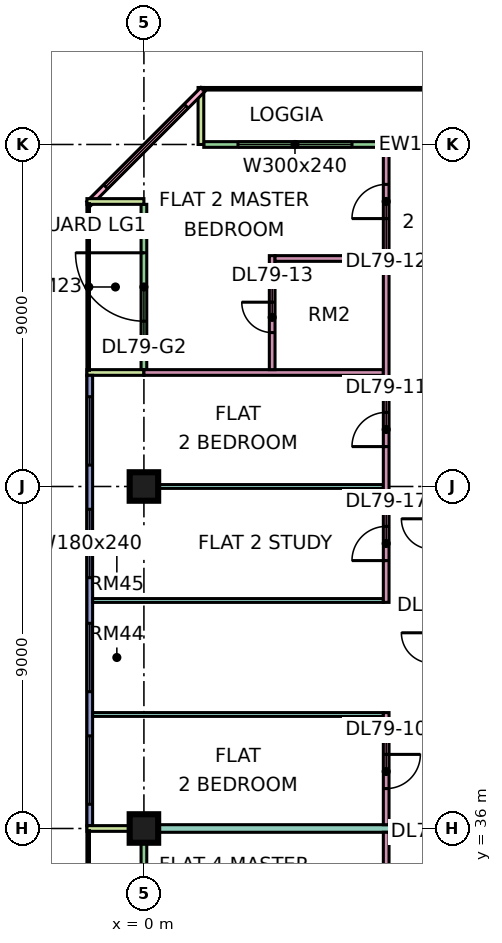
"""IFC4 building model, lengths in metres.
Left out: names, types, materials, properties, quantities, classifications, styles, units other than length and angle.
Written with IfcOpenShell. Run it as: python <this file> out.ifc"""

import sys

from ifc_helpers import new_model, si_unit, direction, frame, frame_2d, origin, origin_2d, place, context, subcontext, project, spatial, rectangle, extrude, element, fill, save


model = new_model("IFC4")
c1 = context("Model", 3, precision=1e-05, world=origin(), true_north=direction((0.0, 1.0)))
c2 = subcontext(c1, "Body", "Model", "MODEL_VIEW")
j1 = project(units=[si_unit("LENGTHUNIT", "METRE"), si_unit("PLANEANGLEUNIT", "RADIAN")], contexts=[c1])
p1 = place(None, origin())
s1 = spatial("IfcSite", under=j1, at=p1, CompositionType="ELEMENT")
p2 = place(p1, origin())
s2 = spatial("IfcBuilding", under=s1, at=p2, CompositionType="ELEMENT")
p3 = place(p2, frame((0.0, 0.0, 342.65)))
s3 = spatial("IfcBuildingStorey", under=s2, at=p3, CompositionType="ELEMENT", Elevation=342.65)
p4 = place(p3, frame((0.0, 36.0, 0.0), z_axis=(0.0, 0.0, 1.0), x_axis=(1.0, 0.0, 0.0)))
e1 = element("IfcColumn", 1, at=p4, inside=s3, PredefinedType="COLUMN", context=c2, shape_type="SweptSolid", body=[
    extrude(rectangle(XDim=0.75, YDim=0.75, at=origin_2d()), origin(), (0.0, 0.0, 1.0), 3.75),
])
p5 = place(p3, frame((0.0, 45.0, 0.0), z_axis=(0.0, 0.0, 1.0), x_axis=(1.0, 0.0, 0.0)))
e2 = element("IfcColumn", 2, at=p5, inside=s3, PredefinedType="COLUMN", context=c2, shape_type="SweptSolid", body=[
    extrude(rectangle(XDim=0.75, YDim=0.75, at=origin_2d()), origin(), (0.0, 0.0, 1.0), 3.75),
])
p6 = place(p3, frame((11.925, 54.0, 0.0), z_axis=(0.0, 0.0, 1.0), x_axis=(-1.0, 0.0, 0.0)))
e3 = element("IfcWall", 3, at=p6, inside=s3, PredefinedType="SOLIDWALL", context=c2, shape_type="SweptSolid", body=[
    extrude(rectangle(XDim=10.35, YDim=0.15, at=frame_2d((5.175, 0.0))), origin(), (0.0, 0.0, 1.0), 3.35),
])
p7 = place(p6, frame((2.075, 0.0, 0.0)))
e4 = element("IfcOpeningElement", 4, at=p7, cuts=e3, PredefinedType="OPENING", context=c2, shape_type="SweptSolid", body=[
    extrude(rectangle(XDim=1.8, YDim=2.4, at=frame_2d((0.9, 1.2))), frame((0.0, 0.085, 0.0), z_axis=(0.0, -1.0, 0.0), x_axis=(1.0, 0.0, 0.0)), (0.0, 0.0, 1.0), 0.17),
])
p8 = place(p6, frame((6.45, 0.0, 0.45)))
e5 = element("IfcOpeningElement", 5, at=p8, cuts=e3, PredefinedType="OPENING", context=c2, shape_type="SweptSolid", body=[
    extrude(rectangle(XDim=3.0, YDim=2.4, at=frame_2d((1.5, 1.2))), frame((0.0, 0.085, 0.0), z_axis=(0.0, -1.0, 0.0), x_axis=(1.0, 0.0, 0.0)), (0.0, 0.0, 1.0), 0.17),
])
p9 = place(p3, frame((1.5, 55.5, 0.0), z_axis=(0.0, 0.0, 1.0), x_axis=(0.0, -1.0, 0.0)))
e6 = element("IfcWall", 6, at=p9, inside=s3, PredefinedType="SOLIDWALL", context=c2, shape_type="SweptSolid", body=[
    extrude(rectangle(XDim=1.5, YDim=0.15, at=frame_2d((0.75, 0.0))), origin(), (0.0, 0.0, 1.0), 3.35),
])
p10 = place(p3, frame((1.553, 55.447, 0.0), z_axis=(0.0, 0.0, 1.0), x_axis=(-0.707106781187, -0.707106781187, 0.0)))
e7 = element("IfcWall", 7, at=p10, inside=s3, PredefinedType="SOLIDWALL", context=c2, shape_type="SweptSolid", body=[
    extrude(rectangle(XDim=4.243, YDim=0.15, at=frame_2d((2.121, 0.0))), origin(), (0.0, 0.0, 1.0), 3.35),
])
p11 = place(p10, frame((0.621, 0.0, 0.45)))
e8 = element("IfcOpeningElement", 8, at=p11, cuts=e7, PredefinedType="OPENING", context=c2, shape_type="SweptSolid", body=[
    extrude(rectangle(XDim=3.0, YDim=2.4, at=frame_2d((1.5, 1.2))), frame((0.0, 0.085, 0.0), z_axis=(0.0, -1.0, 0.0), x_axis=(1.0, 0.0, 0.0)), (0.0, 0.0, 1.0), 0.17),
])
p12 = place(p3, frame((0.0, 52.425, 0.0), z_axis=(0.0, 0.0, 1.0), x_axis=(0.0, -1.0, 0.0)))
e9 = element("IfcWall", 9, at=p12, inside=s3, PredefinedType="SOLIDWALL", context=c2, shape_type="SweptSolid", body=[
    extrude(rectangle(XDim=4.35, YDim=0.15, at=frame_2d((2.175, 0.0))), origin(), (0.0, 0.0, 1.0), 3.35),
])
p13 = place(p12, frame((1.275, 0.0, 0.0)))
e10 = element("IfcOpeningElement", 10, at=p13, cuts=e9, PredefinedType="OPENING", context=c2, shape_type="SweptSolid", body=[
    extrude(rectangle(XDim=1.8, YDim=2.4, at=frame_2d((0.9, 1.2))), frame((0.0, 0.085, 0.0), z_axis=(0.0, -1.0, 0.0), x_axis=(1.0, 0.0, 0.0)), (0.0, 0.0, 1.0), 0.17),
])
for number, where, z_axis, x_axis in (
    (11, (-1.5, 52.5, 0.0), (0.0, 0.0, 1.0), (1.0, 0.0, 0.0)),
    (12, (-1.5, 48.0, 0.0), (0.0, 0.0, 1.0), (1.0, 0.0, 0.0)),
):
    element("IfcWall", number, at=place(p3, frame(where, z_axis=z_axis, x_axis=x_axis)), inside=s3, PredefinedType="SOLIDWALL", context=c2, shape_type="SweptSolid", body=[
        extrude(rectangle(XDim=1.5, YDim=0.15, at=frame_2d((0.75, 0.0))), origin(), (0.0, 0.0, 1.0), 3.35),
    ])
p14 = place(p3, frame((-1.425, 47.925, 0.0), z_axis=(0.0, 0.0, 1.0), x_axis=(0.0, -1.0, 0.0)))
e13 = element("IfcWall", 13, at=p14, inside=s3, PredefinedType="SOLIDWALL", context=c2, shape_type="SweptSolid", body=[
    extrude(rectangle(XDim=11.85, YDim=0.15, at=frame_2d((5.925, 0.0))), origin(), (0.0, 0.0, 1.0), 3.35),
])
p15 = place(p14, frame((0.562, 0.0, 0.45)))
e14 = element("IfcOpeningElement", 14, at=p15, cuts=e13, PredefinedType="OPENING", context=c2, shape_type="SweptSolid", body=[
    extrude(rectangle(XDim=1.8, YDim=2.4, at=frame_2d((0.9, 1.2))), frame((0.0, 0.085, 0.0), z_axis=(0.0, -1.0, 0.0), x_axis=(1.0, 0.0, 0.0)), (0.0, 0.0, 1.0), 0.17),
])
p16 = place(p14, frame((3.525, 0.0, 0.45)))
e15 = element("IfcOpeningElement", 15, at=p16, cuts=e13, PredefinedType="OPENING", context=c2, shape_type="SweptSolid", body=[
    extrude(rectangle(XDim=1.8, YDim=2.4, at=frame_2d((0.9, 1.2))), frame((0.0, 0.085, 0.0), z_axis=(0.0, -1.0, 0.0), x_axis=(1.0, 0.0, 0.0)), (0.0, 0.0, 1.0), 0.17),
])
p17 = place(p14, frame((6.525, 0.0, 0.45)))
e16 = element("IfcOpeningElement", 16, at=p17, cuts=e13, PredefinedType="OPENING", context=c2, shape_type="SweptSolid", body=[
    extrude(rectangle(XDim=1.8, YDim=2.4, at=frame_2d((0.9, 1.2))), frame((0.0, 0.085, 0.0), z_axis=(0.0, -1.0, 0.0), x_axis=(1.0, 0.0, 0.0)), (0.0, 0.0, 1.0), 0.17),
])
p18 = place(p14, frame((9.488, 0.0, 0.45)))
e17 = element("IfcOpeningElement", 17, at=p18, cuts=e13, PredefinedType="OPENING", context=c2, shape_type="SweptSolid", body=[
    extrude(rectangle(XDim=1.8, YDim=2.4, at=frame_2d((0.9, 1.2))), frame((0.0, 0.085, 0.0), z_axis=(0.0, -1.0, 0.0), x_axis=(1.0, 0.0, 0.0)), (0.0, 0.0, 1.0), 0.17),
])
p19 = place(p3, frame((0.0, 35.925, 0.0), z_axis=(0.0, 0.0, 1.0), x_axis=(0.0, -1.0, 0.0)))
e18 = element("IfcWall", 18, at=p19, inside=s3, PredefinedType="SOLIDWALL", context=c2, shape_type="SweptSolid", body=[
    extrude(rectangle(XDim=11.85, YDim=0.15, at=frame_2d((5.925, 0.0))), origin(), (0.0, 0.0, 1.0), 3.35),
])
p20 = place(p19, frame((2.262, 0.0, 0.0)))
e19 = element("IfcOpeningElement", 19, at=p20, cuts=e18, PredefinedType="OPENING", context=c2, shape_type="SweptSolid", body=[
    extrude(rectangle(XDim=1.8, YDim=2.4, at=frame_2d((0.9, 1.2))), frame((0.0, 0.085, 0.0), z_axis=(0.0, -1.0, 0.0), x_axis=(1.0, 0.0, 0.0)), (0.0, 0.0, 1.0), 0.17),
])
p21 = place(p19, frame((7.188, 0.0, 0.45)))
e20 = element("IfcOpeningElement", 20, at=p21, cuts=e18, PredefinedType="OPENING", context=c2, shape_type="SweptSolid", body=[
    extrude(rectangle(XDim=3.0, YDim=2.4, at=frame_2d((1.5, 1.2))), frame((0.0, 0.085, 0.0), z_axis=(0.0, -1.0, 0.0), x_axis=(1.0, 0.0, 0.0)), (0.0, 0.0, 1.0), 0.17),
])
p22 = place(p3, frame((-1.5, 36.0, 0.0), z_axis=(0.0, 0.0, 1.0), x_axis=(1.0, 0.0, 0.0)))
e21 = element("IfcWall", 21, at=p22, inside=s3, PredefinedType="SOLIDWALL", context=c2, shape_type="SweptSolid", body=[
    extrude(rectangle(XDim=1.5, YDim=0.15, at=frame_2d((0.75, 0.0))), origin(), (0.0, 0.0, 1.0), 3.35),
])
e22 = element("IfcWall", 22, at=p4, inside=s3, PredefinedType="PARTITIONING", context=c2, shape_type="SweptSolid", body=[
    extrude(rectangle(XDim=12.275, YDim=0.2, at=frame_2d((6.137, 0.0))), origin(), (0.0, 0.0, 1.0), 3.35),
])
for number, where, z_axis, x_axis in (
    (23, (-1.35, 39.0, 0.0), (0.0, 0.0, 1.0), (1.0, 0.0, 0.0)),
    (24, (-1.35, 42.0, 0.0), (0.0, 0.0, 1.0), (1.0, 0.0, 0.0)),
):
    element("IfcWall", number, at=place(p3, frame(where, z_axis=z_axis, x_axis=x_axis)), inside=s3, PredefinedType="PARTITIONING", context=c2, shape_type="SweptSolid", body=[
        extrude(rectangle(XDim=7.65, YDim=0.1, at=frame_2d((3.825, 0.0))), origin(), (0.0, 0.0, 1.0), 3.35),
    ])
e25 = element("IfcWall", 25, at=p5, inside=s3, PredefinedType="PARTITIONING", context=c2, shape_type="SweptSolid", body=[
    extrude(rectangle(XDim=6.3, YDim=0.1, at=frame_2d((3.15, 0.0))), origin(), (0.0, 0.0, 1.0), 3.35),
])
p23 = place(p3, frame((0.0, 48.0, 0.0), z_axis=(0.0, 0.0, 1.0), x_axis=(1.0, 0.0, 0.0)))
e26 = element("IfcWall", 26, at=p23, inside=s3, PredefinedType="PARTITIONING", context=c2, shape_type="SweptSolid", body=[
    extrude(rectangle(XDim=6.3, YDim=0.15, at=frame_2d((3.15, 0.0))), origin(), (0.0, 0.0, 1.0), 3.35),
])
p24 = place(p3, frame((3.375, 48.075, 0.0), z_axis=(0.0, 0.0, 1.0), x_axis=(0.0, 1.0, 0.0)))
e27 = element("IfcWall", 27, at=p24, inside=s3, PredefinedType="PARTITIONING", context=c2, shape_type="SweptSolid", body=[
    extrude(rectangle(XDim=3.0, YDim=0.15, at=frame_2d((1.5, 0.0))), origin(), (0.0, 0.0, 1.0), 3.35),
])
p25 = place(p24, frame((0.975, 0.0, 0.0)))
e28 = element("IfcOpeningElement", 28, at=p25, cuts=e27, PredefinedType="OPENING", context=c2, shape_type="SweptSolid", body=[
    extrude(rectangle(XDim=0.8, YDim=2.1, at=frame_2d((0.4, 1.05))), frame((0.0, 0.085, 0.0), z_axis=(0.0, -1.0, 0.0), x_axis=(1.0, 0.0, 0.0)), (0.0, 0.0, 1.0), 0.17),
])
p26 = place(p3, frame((3.45, 51.0, 0.0), z_axis=(0.0, 0.0, 1.0), x_axis=(1.0, 0.0, 0.0)))
e29 = element("IfcWall", 29, at=p26, inside=s3, PredefinedType="PARTITIONING", context=c2, shape_type="SweptSolid", body=[
    extrude(rectangle(XDim=2.85, YDim=0.15, at=frame_2d((1.425, 0.0))), origin(), (0.0, 0.0, 1.0), 3.35),
])
p27 = place(p3, frame((6.375, 30.075, 0.0), z_axis=(0.0, 0.0, 1.0), x_axis=(0.0, 1.0, 0.0)))
e30 = element("IfcWall", 30, at=p27, inside=s3, PredefinedType="PARTITIONING", context=c2, shape_type="SweptSolid", body=[
    extrude(rectangle(XDim=5.825, YDim=0.15, at=frame_2d((2.913, 0.0))), origin(), (0.0, 0.0, 1.0), 3.35),
])
p28 = place(p27, frame((3.975, 0.0, 0.0)))
e31 = element("IfcOpeningElement", 31, at=p28, cuts=e30, PredefinedType="OPENING", context=c2, shape_type="SweptSolid", body=[
    extrude(rectangle(XDim=0.9, YDim=2.1, at=frame_2d((0.45, 1.05))), frame((0.0, 0.085, 0.0), z_axis=(0.0, -1.0, 0.0), x_axis=(1.0, 0.0, 0.0)), (0.0, 0.0, 1.0), 0.17),
])
p29 = place(p3, frame((6.375, 36.1, 0.0), z_axis=(0.0, 0.0, 1.0), x_axis=(0.0, 1.0, 0.0)))
e32 = element("IfcWall", 32, at=p29, inside=s3, PredefinedType="PARTITIONING", context=c2, shape_type="SweptSolid", body=[
    extrude(rectangle(XDim=2.95, YDim=0.15, at=frame_2d((1.475, 0.0))), origin(), (0.0, 0.0, 1.0), 3.35),
])
p30 = place(p29, frame((0.95, 0.0, 0.0)))
e33 = element("IfcOpeningElement", 33, at=p30, cuts=e32, PredefinedType="OPENING", context=c2, shape_type="SweptSolid", body=[
    extrude(rectangle(XDim=0.9, YDim=2.1, at=frame_2d((0.45, 1.05))), frame((0.0, 0.085, 0.0), z_axis=(0.0, -1.0, 0.0), x_axis=(1.0, 0.0, 0.0)), (0.0, 0.0, 1.0), 0.17),
])
p31 = place(p3, frame((6.375, 41.95, 0.0), z_axis=(0.0, 0.0, 1.0), x_axis=(0.0, 1.0, 0.0)))
e34 = element("IfcWall", 34, at=p31, inside=s3, PredefinedType="PARTITIONING", context=c2, shape_type="SweptSolid", body=[
    extrude(rectangle(XDim=11.976, YDim=0.15, at=frame_2d((5.988, 0.0))), origin(), (0.0, 0.0, 1.0), 3.35),
])
p32 = place(p31, frame((4.1, 0.0, 0.0)))
e35 = element("IfcOpeningElement", 35, at=p32, cuts=e34, PredefinedType="OPENING", context=c2, shape_type="SweptSolid", body=[
    extrude(rectangle(XDim=0.9, YDim=2.1, at=frame_2d((0.45, 1.05))), frame((0.0, 0.085, 0.0), z_axis=(0.0, -1.0, 0.0), x_axis=(1.0, 0.0, 0.0)), (0.0, 0.0, 1.0), 0.17),
])
p33 = place(p31, frame((10.1, 0.0, 0.0)))
e36 = element("IfcOpeningElement", 36, at=p33, cuts=e34, PredefinedType="OPENING", context=c2, shape_type="SweptSolid", body=[
    extrude(rectangle(XDim=0.9, YDim=2.1, at=frame_2d((0.45, 1.05))), frame((0.0, 0.085, 0.0), z_axis=(0.0, -1.0, 0.0), x_axis=(1.0, 0.0, 0.0)), (0.0, 0.0, 1.0), 0.17),
])
p34 = place(p31, frame((1.1, 0.0, 0.0)))
e37 = element("IfcOpeningElement", 37, at=p34, cuts=e34, PredefinedType="OPENING", context=c2, shape_type="SweptSolid", body=[
    extrude(rectangle(XDim=0.9, YDim=2.1, at=frame_2d((0.45, 1.05))), frame((0.0, 0.085, 0.0), z_axis=(0.0, -1.0, 0.0), x_axis=(1.0, 0.0, 0.0)), (0.0, 0.0, 1.0), 0.17),
])
p35 = place(p8, origin())
e38 = element("IfcWindow", 38, at=p35, inside=s3, PartitioningType="SINGLE_PANEL", PredefinedType="WINDOW", context=c2, shape_type="SweptSolid", body=[
    extrude(rectangle(XDim=3.0, YDim=2.4, at=frame_2d((1.5, 1.2))), frame((0.0, 0.03, 0.0), z_axis=(0.0, -1.0, 0.0), x_axis=(1.0, 0.0, 0.0)), (0.0, 0.0, 1.0), 0.06),
])
fill(e5, e38)
p36 = place(p11, origin())
e39 = element("IfcWindow", 39, at=p36, inside=s3, PartitioningType="SINGLE_PANEL", PredefinedType="WINDOW", context=c2, shape_type="SweptSolid", body=[
    extrude(rectangle(XDim=3.0, YDim=2.4, at=frame_2d((1.5, 1.2))), frame((0.0, 0.03, 0.0), z_axis=(0.0, -1.0, 0.0), x_axis=(1.0, 0.0, 0.0)), (0.0, 0.0, 1.0), 0.06),
])
fill(e8, e39)
p37 = place(p13, frame((1.8, 0.0, 0.0), z_axis=(0.0, 0.0, 1.0), x_axis=(-1.0, 0.0, 0.0)))
e40 = element("IfcDoor", 40, at=p37, inside=s3, OperationType="DOUBLE_DOOR_SINGLE_SWING", PredefinedType="DOOR", context=c2, shape_type="SweptSolid", body=[
    extrude(rectangle(XDim=1.8, YDim=2.4, at=frame_2d((0.9, 1.2))), frame((0.0, 0.025, 0.0), z_axis=(0.0, -1.0, 0.0), x_axis=(1.0, 0.0, 0.0)), (0.0, 0.0, 1.0), 0.05),
])
fill(e10, e40)
p38 = place(p15, origin())
e41 = element("IfcWindow", 41, at=p38, inside=s3, PartitioningType="SINGLE_PANEL", PredefinedType="WINDOW", context=c2, shape_type="SweptSolid", body=[
    extrude(rectangle(XDim=1.8, YDim=2.4, at=frame_2d((0.9, 1.2))), frame((0.0, 0.03, 0.0), z_axis=(0.0, -1.0, 0.0), x_axis=(1.0, 0.0, 0.0)), (0.0, 0.0, 1.0), 0.06),
])
fill(e14, e41)
p39 = place(p16, origin())
e42 = element("IfcWindow", 42, at=p39, inside=s3, PartitioningType="SINGLE_PANEL", PredefinedType="WINDOW", context=c2, shape_type="SweptSolid", body=[
    extrude(rectangle(XDim=1.8, YDim=2.4, at=frame_2d((0.9, 1.2))), frame((0.0, 0.03, 0.0), z_axis=(0.0, -1.0, 0.0), x_axis=(1.0, 0.0, 0.0)), (0.0, 0.0, 1.0), 0.06),
])
fill(e15, e42)
p40 = place(p17, origin())
e43 = element("IfcWindow", 43, at=p40, inside=s3, PartitioningType="SINGLE_PANEL", PredefinedType="WINDOW", context=c2, shape_type="SweptSolid", body=[
    extrude(rectangle(XDim=1.8, YDim=2.4, at=frame_2d((0.9, 1.2))), frame((0.0, 0.03, 0.0), z_axis=(0.0, -1.0, 0.0), x_axis=(1.0, 0.0, 0.0)), (0.0, 0.0, 1.0), 0.06),
])
fill(e16, e43)
p41 = place(p18, origin())
e44 = element("IfcWindow", 44, at=p41, inside=s3, PartitioningType="SINGLE_PANEL", PredefinedType="WINDOW", context=c2, shape_type="SweptSolid", body=[
    extrude(rectangle(XDim=1.8, YDim=2.4, at=frame_2d((0.9, 1.2))), frame((0.0, 0.03, 0.0), z_axis=(0.0, -1.0, 0.0), x_axis=(1.0, 0.0, 0.0)), (0.0, 0.0, 1.0), 0.06),
])
fill(e17, e44)
p42 = place(p30, origin())
e45 = element("IfcDoor", 45, at=p42, inside=s3, OperationType="SINGLE_SWING_RIGHT", PredefinedType="DOOR", context=c2, shape_type="SweptSolid", body=[
    extrude(rectangle(XDim=0.9, YDim=2.1, at=frame_2d((0.45, 1.05))), frame((0.0, 0.025, 0.0), z_axis=(0.0, -1.0, 0.0), x_axis=(1.0, 0.0, 0.0)), (0.0, 0.0, 1.0), 0.05),
])
fill(e33, e45)
p43 = place(p32, origin())
e46 = element("IfcDoor", 46, at=p43, inside=s3, OperationType="SINGLE_SWING_LEFT", PredefinedType="DOOR", context=c2, shape_type="SweptSolid", body=[
    extrude(rectangle(XDim=0.9, YDim=2.1, at=frame_2d((0.45, 1.05))), frame((0.0, 0.025, 0.0), z_axis=(0.0, -1.0, 0.0), x_axis=(1.0, 0.0, 0.0)), (0.0, 0.0, 1.0), 0.05),
])
fill(e35, e46)
p44 = place(p33, origin())
e47 = element("IfcDoor", 47, at=p44, inside=s3, OperationType="SINGLE_SWING_LEFT", PredefinedType="DOOR", context=c2, shape_type="SweptSolid", body=[
    extrude(rectangle(XDim=0.9, YDim=2.1, at=frame_2d((0.45, 1.05))), frame((0.0, 0.025, 0.0), z_axis=(0.0, -1.0, 0.0), x_axis=(1.0, 0.0, 0.0)), (0.0, 0.0, 1.0), 0.05),
])
fill(e36, e47)
p45 = place(p25, frame((0.8, 0.0, 0.0), z_axis=(0.0, 0.0, 1.0), x_axis=(-1.0, 0.0, 0.0)))
e48 = element("IfcDoor", 48, at=p45, inside=s3, OperationType="SINGLE_SWING_RIGHT", PredefinedType="DOOR", context=c2, shape_type="SweptSolid", body=[
    extrude(rectangle(XDim=0.8, YDim=2.1, at=frame_2d((0.4, 1.05))), frame((0.0, 0.025, 0.0), z_axis=(0.0, -1.0, 0.0), x_axis=(1.0, 0.0, 0.0)), (0.0, 0.0, 1.0), 0.05),
])
fill(e28, e48)
p46 = place(p34, origin())
e49 = element("IfcDoor", 49, at=p46, inside=s3, OperationType="SINGLE_SWING_LEFT", PredefinedType="DOOR", context=c2, shape_type="SweptSolid", body=[
    extrude(rectangle(XDim=0.9, YDim=2.1, at=frame_2d((0.45, 1.05))), frame((0.0, 0.025, 0.0), z_axis=(0.0, -1.0, 0.0), x_axis=(1.0, 0.0, 0.0)), (0.0, 0.0, 1.0), 0.05),
])
fill(e37, e49)
save(model, sys.argv[1])
